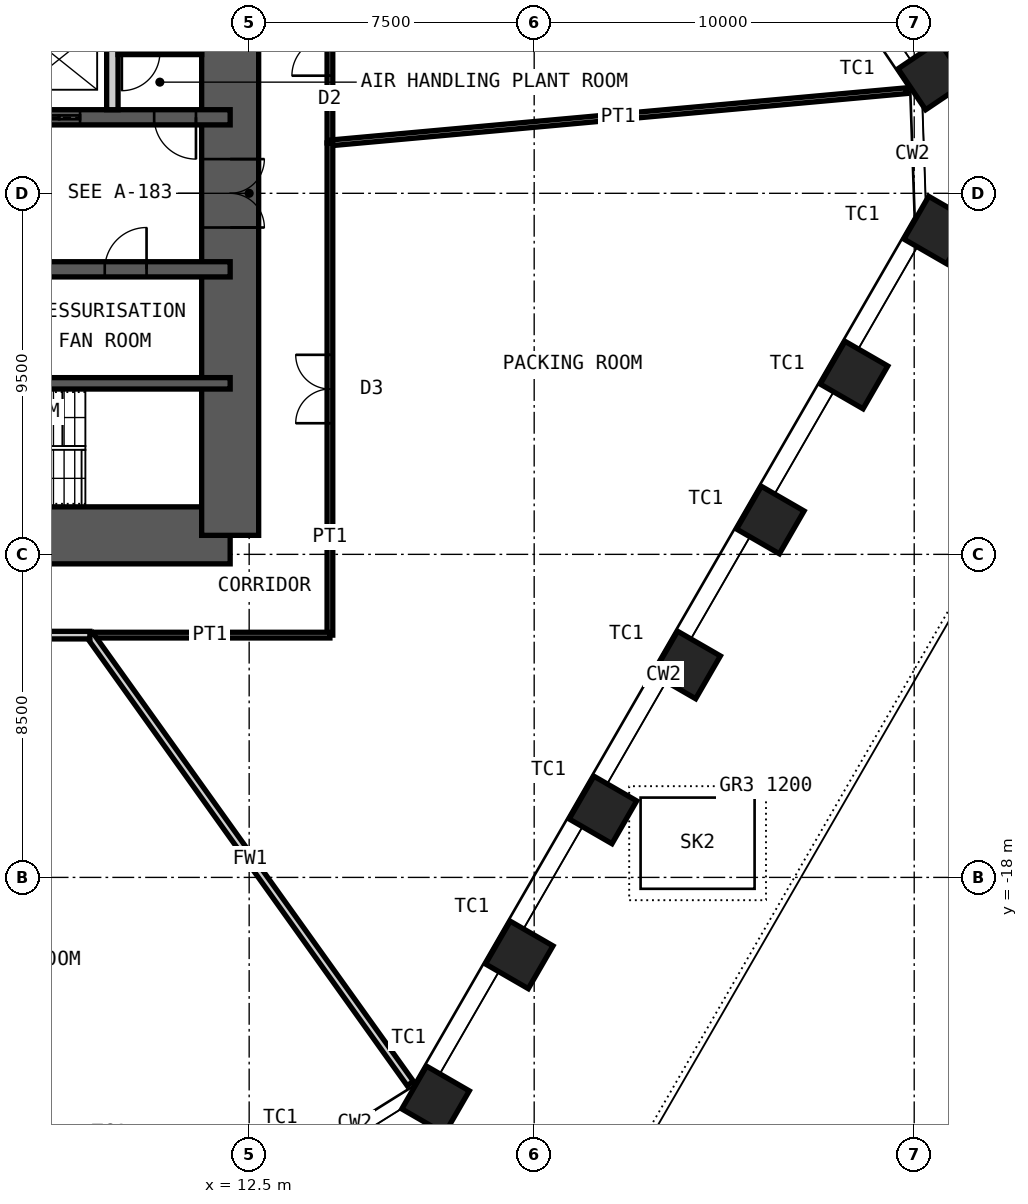
"""IFC4 building model, lengths in metres.
Left out: names, types, materials, properties, quantities, classifications, styles, units other than length and angle.
Written with IfcOpenShell. Run it as: python <this file> out.ifc"""

import sys

from ifc_helpers import new_model, si_unit, direction, frame, frame_2d, origin, origin_2d, place, context, subcontext, project, spatial, rectangle, hollow_rectangle, extrude, element, fill, save


model = new_model("IFC4")
c1 = context("Model", 3, precision=1e-05, world=origin(), true_north=direction((0.0, 1.0)))
c2 = subcontext(c1, "Body", "Model", "MODEL_VIEW")
j1 = project(units=[si_unit("LENGTHUNIT", "METRE"), si_unit("PLANEANGLEUNIT", "RADIAN")], contexts=[c1])
p1 = place(None, origin())
s1 = spatial("IfcSite", under=j1, at=p1, CompositionType="ELEMENT")
p2 = place(p1, origin())
s2 = spatial("IfcBuilding", under=s1, at=p2, CompositionType="ELEMENT")
p3 = place(p2, frame((0.0, 0.0, 17.0)))
s3 = spatial("IfcBuildingStorey", under=s2, at=p3, CompositionType="ELEMENT", Elevation=17.0)
for number, where, z_axis, x_axis in (
    (1, (30.476, 3.101, 0.0), (0.0, 0.0, 1.0), (-0.559, 0.829, 0.0)),
    (2, (30.618, -0.967, 0.0), (0.0, 0.0, 1.0), (0.5, 0.866, 0.0)),
    (3, (28.416, -4.782, 0.0), (0.0, 0.0, 1.0), (0.5, 0.866, 0.0)),
    (4, (26.214, -8.596, 0.0), (0.0, 0.0, 1.0), (0.5, 0.866, 0.0)),
    (5, (24.011, -12.411, 0.0), (0.0, 0.0, 1.0), (0.5, 0.866, 0.0)),
    (6, (21.809, -16.225, 0.0), (0.0, 0.0, 1.0), (0.5, 0.866, 0.0)),
    (7, (19.607, -20.04, 0.0), (0.0, 0.0, 1.0), (0.5, 0.866, 0.0)),
    (8, (17.405, -23.854, 0.0), (0.0, 0.0, 1.0), (0.5, 0.866, 0.0)),
):
    element("IfcColumn", number, at=place(p3, frame(where, z_axis=z_axis, x_axis=x_axis)), inside=s3, PredefinedType="COLUMN", context=c2, shape_type="SweptSolid", body=[
        extrude(hollow_rectangle(XDim=1.3, YDim=1.3, WallThickness=0.1, at=origin_2d()), origin(), (0.0, 0.0, 1.0), 5.0),
    ])
p4 = place(p3, frame((-12.0, -9.0, 0.0), z_axis=(0.0, 0.0, 1.0), x_axis=(1.0, 0.0, 0.0)))
e9 = element("IfcWall", 9, at=p4, inside=s3, PredefinedType="SHEAR", context=c2, shape_type="SweptSolid", body=[
    extrude(rectangle(XDim=24.0, YDim=1.5, at=frame_2d((12.0, 0.0))), origin(), (0.0, 0.0, 1.0), 5.0),
])
p5 = place(p4, frame((1.35, 0.0, 0.0)))
e10 = element("IfcOpeningElement", 10, at=p5, cuts=e9, PredefinedType="OPENING", context=c2, shape_type="SweptSolid", body=[
    extrude(rectangle(XDim=1.0, YDim=2.1, at=frame_2d((0.5, 1.05))), frame((0.0, 0.76, 0.0), z_axis=(0.0, -1.0, 0.0), x_axis=(1.0, 0.0, 0.0)), (0.0, 0.0, 1.0), 1.52),
])
p6 = place(p4, frame((5.325, 0.0, 0.0)))
e11 = element("IfcOpeningElement", 11, at=p6, cuts=e9, PredefinedType="OPENING", context=c2, shape_type="SweptSolid", body=[
    extrude(rectangle(XDim=1.15, YDim=2.1, at=frame_2d((0.575, 1.05))), frame((0.0, 0.76, 0.0), z_axis=(0.0, -1.0, 0.0), x_axis=(1.0, 0.0, 0.0)), (0.0, 0.0, 1.0), 1.52),
])
p7 = place(p4, frame((12.6, 0.0, 0.0)))
e12 = element("IfcOpeningElement", 12, at=p7, cuts=e9, PredefinedType="OPENING", context=c2, shape_type="SweptSolid", body=[
    extrude(rectangle(XDim=1.0, YDim=2.1, at=frame_2d((0.5, 1.05))), frame((0.0, 0.76, 0.0), z_axis=(0.0, -1.0, 0.0), x_axis=(1.0, 0.0, 0.0)), (0.0, 0.0, 1.0), 1.52),
])
p8 = place(p3, frame((12.0, -9.0, 0.0), z_axis=(0.0, 0.0, 1.0), x_axis=(0.0, 1.0, 0.0)))
e13 = element("IfcWall", 13, at=p8, inside=s3, PredefinedType="SHEAR", context=c2, shape_type="SweptSolid", body=[
    extrude(rectangle(XDim=18.0, YDim=1.5, at=frame_2d((9.0, 0.0))), origin(), (0.0, 0.0, 1.0), 5.0),
])
p9 = place(p8, frame((8.1, 0.0, 0.0)))
e14 = element("IfcOpeningElement", 14, at=p9, cuts=e13, PredefinedType="OPENING", context=c2, shape_type="SweptSolid", body=[
    extrude(rectangle(XDim=1.8, YDim=2.1, at=frame_2d((0.9, 1.05))), frame((0.0, 0.76, 0.0), z_axis=(0.0, -1.0, 0.0), x_axis=(1.0, 0.0, 0.0)), (0.0, 0.0, 1.0), 1.52),
])
p10 = place(p3, frame((-12.0, 2.0, 0.0), z_axis=(0.0, 0.0, 1.0), x_axis=(1.0, 0.0, 0.0)))
e15 = element("IfcWall", 15, at=p10, inside=s3, PredefinedType="SHEAR", context=c2, shape_type="SweptSolid", body=[
    extrude(rectangle(XDim=24.0, YDim=0.4, at=frame_2d((12.0, 0.0))), origin(), (0.0, 0.0, 1.0), 5.0),
])
p11 = place(p10, frame((2.4, 0.0, 0.0)))
e16 = element("IfcOpeningElement", 16, at=p11, cuts=e15, PredefinedType="OPENING", context=c2, shape_type="SweptSolid", body=[
    extrude(rectangle(XDim=1.1, YDim=2.1, at=frame_2d((0.55, 1.05))), frame((0.0, 0.21, 0.0), z_axis=(0.0, -1.0, 0.0), x_axis=(1.0, 0.0, 0.0)), (0.0, 0.0, 1.0), 0.42),
])
p12 = place(p10, frame((22.0, 0.0, 0.0)))
e17 = element("IfcOpeningElement", 17, at=p12, cuts=e15, PredefinedType="OPENING", context=c2, shape_type="SweptSolid", body=[
    extrude(rectangle(XDim=1.1, YDim=2.1, at=frame_2d((0.55, 1.05))), frame((0.0, 0.21, 0.0), z_axis=(0.0, -1.0, 0.0), x_axis=(1.0, 0.0, 0.0)), (0.0, 0.0, 1.0), 0.42),
])
p13 = place(p10, frame((10.15, 0.0, 0.0)))
e18 = element("IfcOpeningElement", 18, at=p13, cuts=e15, PredefinedType="OPENING", context=c2, shape_type="SweptSolid", body=[
    extrude(rectangle(XDim=1.0, YDim=2.1, at=frame_2d((0.5, 1.05))), frame((0.0, 0.21, 0.0), z_axis=(0.0, -1.0, 0.0), x_axis=(1.0, 0.0, 0.0)), (0.0, 0.0, 1.0), 0.42),
])
p14 = place(p10, frame((6.7, 0.0, 0.0)))
e19 = element("IfcOpeningElement", 19, at=p14, cuts=e15, PredefinedType="OPENING", context=c2, shape_type="SweptSolid", body=[
    extrude(rectangle(XDim=1.4, YDim=2.4, at=frame_2d((0.7, 1.2))), frame((0.0, 0.21, 0.0), z_axis=(0.0, -1.0, 0.0), x_axis=(1.0, 0.0, 0.0)), (0.0, 0.0, 1.0), 0.42),
])
p15 = place(p10, frame((13.35, 0.0, 0.0)))
e20 = element("IfcOpeningElement", 20, at=p15, cuts=e15, PredefinedType="OPENING", context=c2, shape_type="SweptSolid", body=[
    extrude(rectangle(XDim=1.1, YDim=2.4, at=frame_2d((0.55, 1.2))), frame((0.0, 0.21, 0.0), z_axis=(0.0, -1.0, 0.0), x_axis=(1.0, 0.0, 0.0)), (0.0, 0.0, 1.0), 0.42),
])
p16 = place(p10, frame((16.15, 0.0, 0.0)))
e21 = element("IfcOpeningElement", 21, at=p16, cuts=e15, PredefinedType="OPENING", context=c2, shape_type="SweptSolid", body=[
    extrude(rectangle(XDim=1.1, YDim=2.4, at=frame_2d((0.55, 1.2))), frame((0.0, 0.21, 0.0), z_axis=(0.0, -1.0, 0.0), x_axis=(1.0, 0.0, 0.0)), (0.0, 0.0, 1.0), 0.42),
])
p17 = place(p10, frame((18.95, 0.0, 0.0)))
e22 = element("IfcOpeningElement", 22, at=p17, cuts=e15, PredefinedType="OPENING", context=c2, shape_type="SweptSolid", body=[
    extrude(rectangle(XDim=1.1, YDim=2.4, at=frame_2d((0.55, 1.2))), frame((0.0, 0.21, 0.0), z_axis=(0.0, -1.0, 0.0), x_axis=(1.0, 0.0, 0.0)), (0.0, 0.0, 1.0), 0.42),
])
p18 = place(p3, frame((-12.0, -2.0, 0.0), z_axis=(0.0, 0.0, 1.0), x_axis=(1.0, 0.0, 0.0)))
e23 = element("IfcWall", 23, at=p18, inside=s3, PredefinedType="SHEAR", context=c2, shape_type="SweptSolid", body=[
    extrude(rectangle(XDim=24.0, YDim=0.4, at=frame_2d((12.0, 0.0))), origin(), (0.0, 0.0, 1.0), 5.0),
])
p19 = place(p18, frame((1.1, 0.0, 0.0)))
e24 = element("IfcOpeningElement", 24, at=p19, cuts=e23, PredefinedType="OPENING", context=c2, shape_type="SweptSolid", body=[
    extrude(rectangle(XDim=1.1, YDim=2.1, at=frame_2d((0.55, 1.05))), frame((0.0, 0.21, 0.0), z_axis=(0.0, -1.0, 0.0), x_axis=(1.0, 0.0, 0.0)), (0.0, 0.0, 1.0), 0.42),
])
p20 = place(p18, frame((13.55, 0.0, 0.0)))
e25 = element("IfcOpeningElement", 25, at=p20, cuts=e23, PredefinedType="OPENING", context=c2, shape_type="SweptSolid", body=[
    extrude(rectangle(XDim=1.1, YDim=2.1, at=frame_2d((0.55, 1.05))), frame((0.0, 0.21, 0.0), z_axis=(0.0, -1.0, 0.0), x_axis=(1.0, 0.0, 0.0)), (0.0, 0.0, 1.0), 0.42),
])
p21 = place(p18, frame((20.7, 0.0, 0.0)))
e26 = element("IfcOpeningElement", 26, at=p21, cuts=e23, PredefinedType="OPENING", context=c2, shape_type="SweptSolid", body=[
    extrude(rectangle(XDim=1.1, YDim=2.1, at=frame_2d((0.55, 1.05))), frame((0.0, 0.21, 0.0), z_axis=(0.0, -1.0, 0.0), x_axis=(1.0, 0.0, 0.0)), (0.0, 0.0, 1.0), 0.42),
])
p22 = place(p3, frame((-12.0, -5.0, 0.0), z_axis=(0.0, 0.0, 1.0), x_axis=(1.0, 0.0, 0.0)))
e27 = element("IfcWall", 27, at=p22, inside=s3, PredefinedType="SHEAR", context=c2, shape_type="SweptSolid", body=[
    extrude(rectangle(XDim=24.0, YDim=0.3, at=frame_2d((12.0, 0.0))), origin(), (0.0, 0.0, 1.0), 5.0),
])
p23 = place(p3, frame((8.9, 2.2, 0.0), z_axis=(0.0, 0.0, 1.0), x_axis=(0.0, 1.0, 0.0)))
e28 = element("IfcWall", 28, at=p23, inside=s3, PredefinedType="PARTITIONING", context=c2, shape_type="SweptSolid", body=[
    extrude(rectangle(XDim=2.65, YDim=0.3, at=frame_2d((1.325, 0.0))), origin(), (0.0, 0.0, 1.0), 4.78),
])
p24 = place(p3, frame((9.05, 3.7, 0.0), z_axis=(0.0, 0.0, 1.0), x_axis=(1.0, 0.0, 0.0)))
e29 = element("IfcWall", 29, at=p24, inside=s3, PredefinedType="PARTITIONING", context=c2, shape_type="SweptSolid", body=[
    extrude(rectangle(XDim=2.2, YDim=0.1, at=frame_2d((1.1, 0.0))), origin(), (0.0, 0.0, 1.0), 4.78),
])
p25 = place(p24, frame((0.1, 0.0, 0.0)))
e30 = element("IfcOpeningElement", 30, at=p25, cuts=e29, PredefinedType="OPENING", context=c2, shape_type="SweptSolid", body=[
    extrude(rectangle(XDim=1.0, YDim=2.4, at=frame_2d((0.5, 1.2))), frame((0.0, 0.06, 0.0), z_axis=(0.0, -1.0, 0.0), x_axis=(1.0, 0.0, 0.0)), (0.0, 0.0, 1.0), 0.12),
])
p26 = place(p3, frame((14.625, 5.864, 0.0), z_axis=(0.0, 0.0, 1.0), x_axis=(0.0, -1.0, 0.0)))
e31 = element("IfcWall", 31, at=p26, inside=s3, PredefinedType="PARTITIONING", context=c2, shape_type="SweptSolid", body=[
    extrude(rectangle(XDim=4.539, YDim=0.15, at=frame_2d((2.27, 0.0))), origin(), (0.0, 0.0, 1.0), 4.8),
])
p27 = place(p26, frame((1.77, 0.0, 0.0)))
e32 = element("IfcOpeningElement", 32, at=p27, cuts=e31, PredefinedType="OPENING", context=c2, shape_type="SweptSolid", body=[
    extrude(rectangle(XDim=1.0, YDim=2.4, at=frame_2d((0.5, 1.2))), frame((0.0, 0.085, 0.0), z_axis=(0.0, -1.0, 0.0), x_axis=(1.0, 0.0, 0.0)), (0.0, 0.0, 1.0), 0.17),
])
p28 = place(p3, frame((29.796, 2.7, 0.0), z_axis=(0.0, 0.0, 1.0), x_axis=(-0.99591812791, -0.090261190441, 0.0)))
e33 = element("IfcWall", 33, at=p28, inside=s3, PredefinedType="PARTITIONING", context=c2, shape_type="SweptSolid", body=[
    extrude(rectangle(XDim=15.234, YDim=0.15, at=frame_2d((7.617, 0.0))), origin(), (0.0, 0.0, 1.0), 3.7),
])
p29 = place(p3, frame((14.625, 1.325, 0.0), z_axis=(0.0, 0.0, 1.0), x_axis=(0.0, -1.0, 0.0)))
e34 = element("IfcWall", 34, at=p29, inside=s3, PredefinedType="PARTITIONING", context=c2, shape_type="SweptSolid", body=[
    extrude(rectangle(XDim=12.95, YDim=0.15, at=frame_2d((6.475, 0.0))), origin(), (0.0, 0.0, 1.0), 4.8),
])
p30 = place(p29, frame((5.575, 0.0, 0.0)))
e35 = element("IfcOpeningElement", 35, at=p30, cuts=e34, PredefinedType="OPENING", context=c2, shape_type="SweptSolid", body=[
    extrude(rectangle(XDim=1.8, YDim=2.4, at=frame_2d((0.9, 1.2))), frame((0.0, 0.085, 0.0), z_axis=(0.0, -1.0, 0.0), x_axis=(1.0, 0.0, 0.0)), (0.0, 0.0, 1.0), 0.17),
])
p31 = place(p3, frame((14.625, -11.625, 0.0), z_axis=(0.0, 0.0, 1.0), x_axis=(-1.0, 0.0, 0.0)))
e36 = element("IfcWall", 36, at=p31, inside=s3, PredefinedType="PARTITIONING", context=c2, shape_type="SweptSolid", body=[
    extrude(rectangle(XDim=6.317, YDim=0.15, at=frame_2d((3.158, 0.0))), origin(), (0.0, 0.0, 1.0), 4.8),
])
p32 = place(p3, frame((16.74, -23.423, 0.0), z_axis=(0.0, 0.0, 1.0), x_axis=(-0.581451576506, 0.813581012671, 0.0)))
e37 = element("IfcWall", 37, at=p32, inside=s3, PredefinedType="PARTITIONING", context=c2, shape_type="SweptSolid", body=[
    extrude(rectangle(XDim=14.501, YDim=0.2, at=frame_2d((7.251, 0.0))), origin(), (0.0, 0.0, 1.0), 3.7),
])
p33 = place(p3, frame((8.308, -11.625, 0.0), z_axis=(0.0, 0.0, 1.0), x_axis=(-1.0, 0.0, 0.0)))
e38 = element("IfcWall", 38, at=p33, inside=s3, PredefinedType="PARTITIONING", context=c2, shape_type="SweptSolid", body=[
    extrude(rectangle(XDim=8.052, YDim=0.2, at=frame_2d((4.026, 0.0))), origin(), (0.0, 0.0, 1.0), 4.8),
])
p34 = place(p33, frame((3.026, 0.0, 0.0)))
e39 = element("IfcOpeningElement", 39, at=p34, cuts=e38, PredefinedType="OPENING", context=c2, shape_type="SweptSolid", body=[
    extrude(rectangle(XDim=2.0, YDim=2.4, at=frame_2d((1.0, 1.2))), frame((0.0, 0.11, 0.0), z_axis=(0.0, -1.0, 0.0), x_axis=(1.0, 0.0, 0.0)), (0.0, 0.0, 1.0), 0.22),
])
p35 = place(p12, origin())
e40 = element("IfcDoor", 40, at=p35, inside=s3, OperationType="SINGLE_SWING_RIGHT", PredefinedType="DOOR", context=c2, shape_type="SweptSolid", body=[
    extrude(rectangle(XDim=1.1, YDim=2.1, at=frame_2d((0.55, 1.05))), frame((0.0, 0.025, 0.0), z_axis=(0.0, -1.0, 0.0), x_axis=(1.0, 0.0, 0.0)), (0.0, 0.0, 1.0), 0.05),
])
fill(e17, e40)
p36 = place(p21, origin())
e41 = element("IfcDoor", 41, at=p36, inside=s3, OperationType="SINGLE_SWING_LEFT", PredefinedType="DOOR", context=c2, shape_type="SweptSolid", body=[
    extrude(rectangle(XDim=1.1, YDim=2.1, at=frame_2d((0.55, 1.05))), frame((0.0, 0.025, 0.0), z_axis=(0.0, -1.0, 0.0), x_axis=(1.0, 0.0, 0.0)), (0.0, 0.0, 1.0), 0.05),
])
fill(e26, e41)
p37 = place(p9, origin())
e42 = element("IfcDoor", 42, at=p37, inside=s3, OperationType="DOUBLE_DOOR_DOUBLE_SWING", PredefinedType="DOOR", context=c2, shape_type="SweptSolid", body=[
    extrude(rectangle(XDim=1.8, YDim=2.1, at=frame_2d((0.9, 1.05))), frame((0.0, 0.025, 0.0), z_axis=(0.0, -1.0, 0.0), x_axis=(1.0, 0.0, 0.0)), (0.0, 0.0, 1.0), 0.05),
])
fill(e14, e42)
p38 = place(p17, origin())
e43 = element("IfcDoor", 43, at=p38, inside=s3, OperationType="DOUBLE_DOOR_SLIDING", PredefinedType="DOOR", context=c2, shape_type="SweptSolid", body=[
    extrude(rectangle(XDim=1.1, YDim=2.4, at=frame_2d((0.55, 1.2))), frame((0.0, 0.025, 0.0), z_axis=(0.0, -1.0, 0.0), x_axis=(1.0, 0.0, 0.0)), (0.0, 0.0, 1.0), 0.05),
])
fill(e22, e43)
p39 = place(p25, origin())
e44 = element("IfcDoor", 44, at=p39, inside=s3, OperationType="SINGLE_SWING_LEFT", PredefinedType="DOOR", context=c2, shape_type="SweptSolid", body=[
    extrude(rectangle(XDim=1.0, YDim=2.4, at=frame_2d((0.5, 1.2))), frame((0.0, 0.025, 0.0), z_axis=(0.0, -1.0, 0.0), x_axis=(1.0, 0.0, 0.0)), (0.0, 0.0, 1.0), 0.05),
])
fill(e30, e44)
p40 = place(p27, origin())
e45 = element("IfcDoor", 45, at=p40, inside=s3, OperationType="SINGLE_SWING_RIGHT", PredefinedType="DOOR", context=c2, shape_type="SweptSolid", body=[
    extrude(rectangle(XDim=1.0, YDim=2.4, at=frame_2d((0.5, 1.2))), frame((0.0, 0.025, 0.0), z_axis=(0.0, -1.0, 0.0), x_axis=(1.0, 0.0, 0.0)), (0.0, 0.0, 1.0), 0.05),
])
fill(e32, e45)
p41 = place(p30, origin())
e46 = element("IfcDoor", 46, at=p41, inside=s3, OperationType="DOUBLE_DOOR_DOUBLE_SWING", PredefinedType="DOOR", context=c2, shape_type="SweptSolid", body=[
    extrude(rectangle(XDim=1.8, YDim=2.4, at=frame_2d((0.9, 1.2))), frame((0.0, 0.025, 0.0), z_axis=(0.0, -1.0, 0.0), x_axis=(1.0, 0.0, 0.0)), (0.0, 0.0, 1.0), 0.05),
])
fill(e35, e46)
p42 = place(p3, frame((0.0, 0.0, -0.3)))
p43 = place(p42, frame((24.3, -17.1, 0.0)))
p44 = place(p43, frame((0.0, 0.0, 0.25)))
e47 = element("IfcWindow", 47, at=p44, inside=s3, PartitioningType="SINGLE_PANEL", PredefinedType="SKYLIGHT", context=c2, shape_type="SweptSolid", body=[
    extrude(rectangle(XDim=3.0, YDim=2.4, at=origin_2d()), origin(), (0.0, 0.0, 1.0), 0.05),
])
save(model, sys.argv[1])
